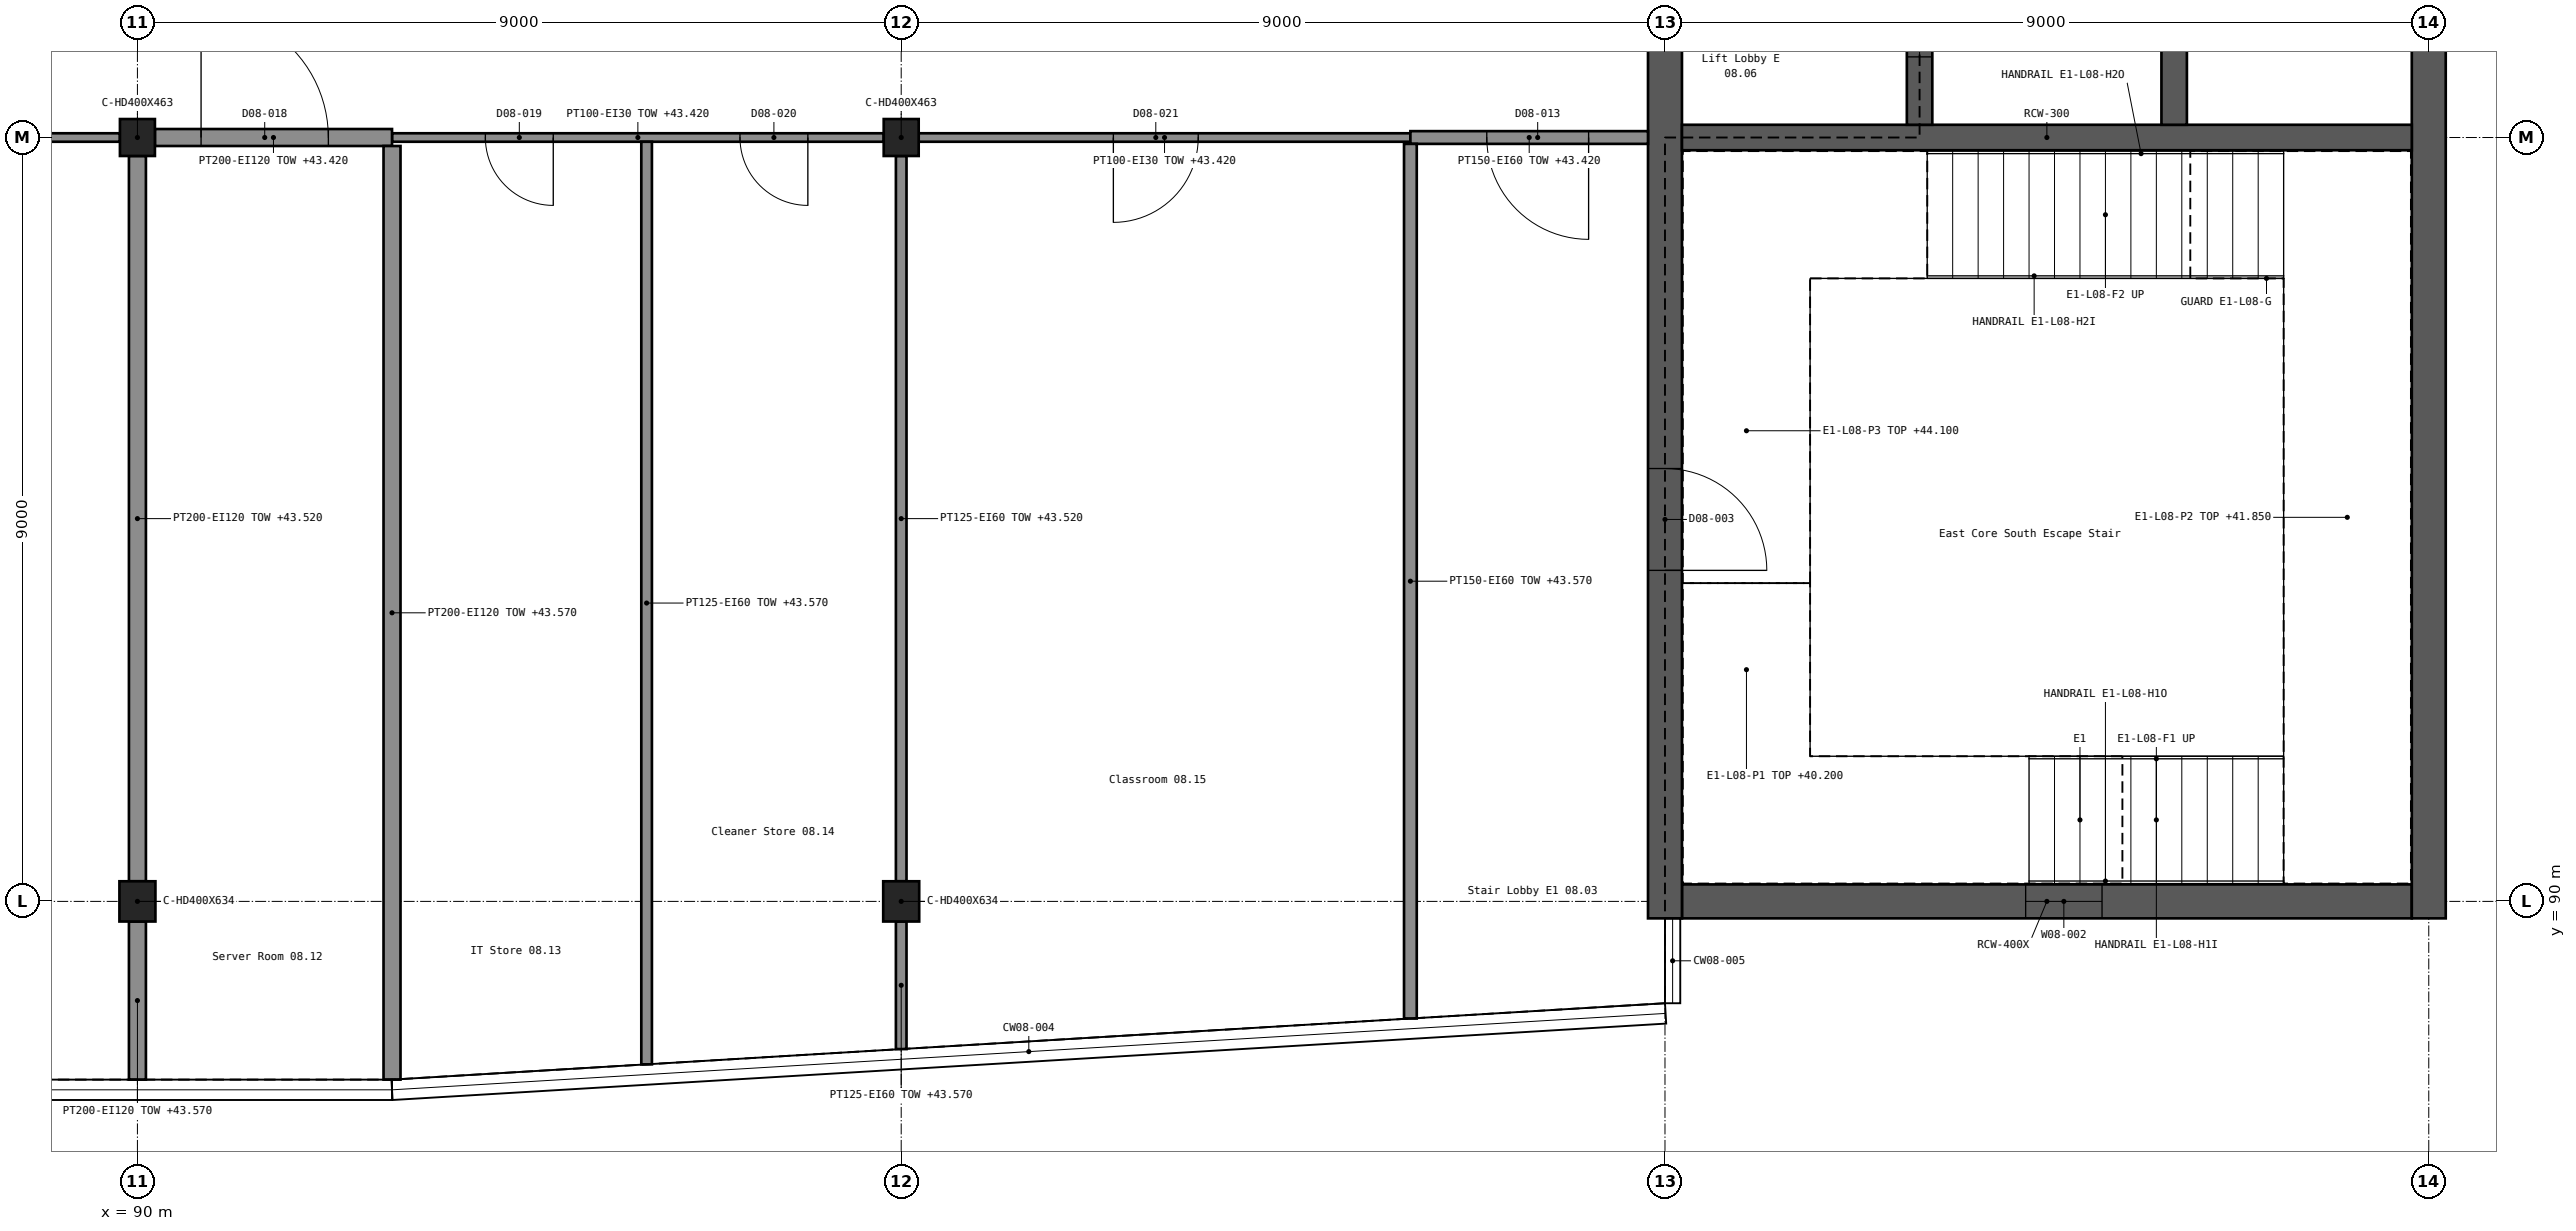
"""IFC4 building model, lengths in metres.
Left out: names, types, materials, properties, quantities, classifications, styles, units other than length and angle.
Written with IfcOpenShell. Run it as: python <this file> out.ifc"""

import sys

from ifc_helpers import new_model, si_unit, direction, frame, frame_2d, origin, origin_2d, place, context, subcontext, project, spatial, rectangle, i_section, extrude, element, fill, save


model = new_model("IFC4")
c1 = context("Model", 3, precision=1e-05, world=origin(), true_north=direction((0.0, 1.0)))
c2 = subcontext(c1, "Body", "Model", "MODEL_VIEW")
j1 = project(units=[si_unit("LENGTHUNIT", "METRE"), si_unit("PLANEANGLEUNIT", "RADIAN")], contexts=[c1])
p1 = place(None, origin())
s1 = spatial("IfcSite", under=j1, at=p1, CompositionType="ELEMENT")
p2 = place(p1, origin())
s2 = spatial("IfcBuilding", under=s1, at=p2, CompositionType="ELEMENT")
p3 = place(p2, frame((0.0, 0.0, 40.2)))
s3 = spatial("IfcBuildingStorey", under=s2, at=p3, CompositionType="ELEMENT", Elevation=40.2)
p4 = place(p3, frame((108.2, 90.0, 0.0), z_axis=(0.0, 0.0, 1.0), x_axis=(1.0, 0.0, 0.0)))
e1 = element("IfcWall", 1, at=p4, inside=s3, PredefinedType="SHEAR", context=c2, shape_type="SweptSolid", body=[
    extrude(rectangle(XDim=8.6, YDim=0.4, at=frame_2d((4.3, 0.0))), origin(), (0.0, 0.0, 1.0), 3.9),
])
p5 = place(p4, frame((4.05, 0.0, 1.2)))
e2 = element("IfcOpeningElement", 2, at=p5, cuts=e1, PredefinedType="OPENING", context=c2, shape_type="SweptSolid", body=[
    extrude(rectangle(XDim=0.9, YDim=1.5, at=frame_2d((0.45, 0.75))), frame((0.0, 0.211, 0.0), z_axis=(0.0, -1.0, 0.0), x_axis=(1.0, 0.0, 0.0)), (0.0, 0.0, 1.0), 0.422),
])
p6 = place(p3, frame((108.0, 89.8, 0.0), z_axis=(0.0, 0.0, 1.0), x_axis=(0.0, 1.0, 0.0)))
e3 = element("IfcWall", 3, at=p6, inside=s3, PredefinedType="SHEAR", context=c2, shape_type="SweptSolid", body=[
    extrude(rectangle(XDim=27.4, YDim=0.4, at=frame_2d((13.7, 0.0))), origin(), (0.0, 0.0, 1.0), 3.9),
])
p7 = place(p6, frame((4.1, 0.0, 0.0)))
e4 = element("IfcOpeningElement", 4, at=p7, cuts=e3, PredefinedType="OPENING", context=c2, shape_type="SweptSolid", body=[
    extrude(rectangle(XDim=1.2, YDim=2.1, at=frame_2d((0.6, 1.05))), frame((0.0, 0.211, 0.0), z_axis=(0.0, -1.0, 0.0), x_axis=(1.0, 0.0, 0.0)), (0.0, 0.0, 1.0), 0.422),
])
p8 = place(p6, frame((22.1, 0.0, 0.0)))
e5 = element("IfcOpeningElement", 5, at=p8, cuts=e3, PredefinedType="OPENING", context=c2, shape_type="SweptSolid", body=[
    extrude(rectangle(XDim=1.2, YDim=2.1, at=frame_2d((0.6, 1.05))), frame((0.0, 0.211, 0.0), z_axis=(0.0, -1.0, 0.0), x_axis=(1.0, 0.0, 0.0)), (0.0, 0.0, 1.0), 0.422),
])
p9 = place(p6, frame((12.5, 0.0, 0.0)))
e6 = element("IfcOpeningElement", 6, at=p9, cuts=e3, PredefinedType="OPENING", context=c2, shape_type="SweptSolid", body=[
    extrude(rectangle(XDim=2.0, YDim=2.1, at=frame_2d((1.0, 1.05))), frame((0.0, 0.211, 0.0), z_axis=(0.0, -1.0, 0.0), x_axis=(1.0, 0.0, 0.0)), (0.0, 0.0, 1.0), 0.422),
])
p10 = place(p3, frame((117.0, 89.8, 0.0), z_axis=(0.0, 0.0, 1.0), x_axis=(0.0, 1.0, 0.0)))
e7 = element("IfcWall", 7, at=p10, inside=s3, PredefinedType="SHEAR", context=c2, shape_type="SweptSolid", body=[
    extrude(rectangle(XDim=27.4, YDim=0.4, at=frame_2d((13.7, 0.0))), origin(), (0.0, 0.0, 1.0), 3.9),
])
p11 = place(p3, frame((108.2, 99.0, 0.0), z_axis=(0.0, 0.0, 1.0), x_axis=(1.0, 0.0, 0.0)))
e8 = element("IfcWall", 8, at=p11, inside=s3, PredefinedType="SHEAR", context=c2, shape_type="SweptSolid", body=[
    extrude(rectangle(XDim=8.6, YDim=0.3, at=frame_2d((4.3, 0.0))), origin(), (0.0, 0.0, 1.0), 3.9),
])
p12 = place(p3, frame((111.0, 99.15, 0.0), z_axis=(0.0, 0.0, 1.0), x_axis=(0.0, 1.0, 0.0)))
e9 = element("IfcWall", 9, at=p12, inside=s3, PredefinedType="SHEAR", context=c2, shape_type="SweptSolid", body=[
    extrude(rectangle(XDim=8.7, YDim=0.3, at=frame_2d((4.35, 0.0))), origin(), (0.0, 0.0, 1.0), 3.9),
])
p13 = place(p12, frame((0.8, 0.0, 0.0)))
e10 = element("IfcOpeningElement", 10, at=p13, cuts=e9, PredefinedType="OPENING", context=c2, shape_type="SweptSolid", body=[
    extrude(rectangle(XDim=1.1, YDim=2.1, at=frame_2d((0.55, 1.05))), frame((0.0, 0.161, 0.0), z_axis=(0.0, -1.0, 0.0), x_axis=(1.0, 0.0, 0.0)), (0.0, 0.0, 1.0), 0.322),
])
p14 = place(p12, frame((3.8, 0.0, 0.0)))
e11 = element("IfcOpeningElement", 11, at=p14, cuts=e9, PredefinedType="OPENING", context=c2, shape_type="SweptSolid", body=[
    extrude(rectangle(XDim=1.1, YDim=2.1, at=frame_2d((0.55, 1.05))), frame((0.0, 0.161, 0.0), z_axis=(0.0, -1.0, 0.0), x_axis=(1.0, 0.0, 0.0)), (0.0, 0.0, 1.0), 0.322),
])
p15 = place(p12, frame((6.8, 0.0, 0.0)))
e12 = element("IfcOpeningElement", 12, at=p15, cuts=e9, PredefinedType="OPENING", context=c2, shape_type="SweptSolid", body=[
    extrude(rectangle(XDim=1.1, YDim=2.1, at=frame_2d((0.55, 1.05))), frame((0.0, 0.161, 0.0), z_axis=(0.0, -1.0, 0.0), x_axis=(1.0, 0.0, 0.0)), (0.0, 0.0, 1.0), 0.322),
])
p16 = place(p3, frame((114.0, 99.15, 0.0), z_axis=(0.0, 0.0, 1.0), x_axis=(0.0, 1.0, 0.0)))
e13 = element("IfcWall", 13, at=p16, inside=s3, PredefinedType="SHEAR", context=c2, shape_type="SweptSolid", body=[
    extrude(rectangle(XDim=8.7, YDim=0.3, at=frame_2d((4.35, 0.0))), origin(), (0.0, 0.0, 1.0), 3.9),
])
for number, where, z_axis, x_axis in (
    (14, (90.0, 90.0, 0.0), (0.0, 0.0, 1.0), (1.0, 0.0, 0.0)),
    (15, (99.0, 90.0, 0.0), (0.0, 0.0, 1.0), (1.0, 0.0, 0.0)),
):
    element("IfcColumn", number, at=place(p3, frame(where, z_axis=z_axis, x_axis=x_axis)), inside=s3, PredefinedType="COLUMN", context=c2, shape_type="SweptSolid", body=[
        extrude(i_section(OverallWidth=0.424, OverallDepth=0.474, WebThickness=0.048, FlangeThickness=0.077, FilletRadius=0.015, at=origin_2d()), origin(), (0.0, 0.0, 1.0), 3.9),
    ])
for number, where, z_axis, x_axis in (
    (16, (90.0, 99.0, 0.0), (0.0, 0.0, 1.0), (1.0, 0.0, 0.0)),
    (17, (99.0, 99.0, 0.0), (0.0, 0.0, 1.0), (1.0, 0.0, 0.0)),
):
    element("IfcColumn", number, at=place(p3, frame(where, z_axis=z_axis, x_axis=x_axis)), inside=s3, PredefinedType="COLUMN", context=c2, shape_type="SweptSolid", body=[
        extrude(i_section(OverallWidth=0.412, OverallDepth=0.435, WebThickness=0.036, FlangeThickness=0.057, FilletRadius=0.015, at=origin_2d()), origin(), (0.0, 0.0, 1.0), 3.9),
    ])
p17 = place(p3, frame((81.206, 99.0, 0.0), z_axis=(0.0, 0.0, 1.0), x_axis=(1.0, 0.0, 0.0)))
e18 = element("IfcWall", 18, at=p17, inside=s3, PredefinedType="PARTITIONING", context=c2, shape_type="SweptSolid", body=[
    extrude(rectangle(XDim=8.588, YDim=0.1, at=frame_2d((4.294, 0.0))), origin(), (0.0, 0.0, 1.0), 3.22),
])
p18 = place(p17, frame((5.769, 0.0, 0.0)))
e19 = element("IfcOpeningElement", 19, at=p18, cuts=e18, PredefinedType="OPENING", context=c2, shape_type="SweptSolid", body=[
    extrude(rectangle(XDim=1.8, YDim=2.1, at=frame_2d((0.9, 1.05))), frame((0.0, 0.061, 0.0), z_axis=(0.0, -1.0, 0.0), x_axis=(1.0, 0.0, 0.0)), (0.0, 0.0, 1.0), 0.122),
])
p19 = place(p3, frame((93.0, 99.0, 0.0), z_axis=(0.0, 0.0, 1.0), x_axis=(1.0, 0.0, 0.0)))
e20 = element("IfcWall", 20, at=p19, inside=s3, PredefinedType="PARTITIONING", context=c2, shape_type="SweptSolid", body=[
    extrude(rectangle(XDim=5.794, YDim=0.1, at=frame_2d((2.897, 0.0))), origin(), (0.0, 0.0, 1.0), 3.22),
])
p20 = place(p19, frame((1.1, 0.0, 0.0)))
e21 = element("IfcOpeningElement", 21, at=p20, cuts=e20, PredefinedType="OPENING", context=c2, shape_type="SweptSolid", body=[
    extrude(rectangle(XDim=0.8, YDim=2.1, at=frame_2d((0.4, 1.05))), frame((0.0, 0.061, 0.0), z_axis=(0.0, -1.0, 0.0), x_axis=(1.0, 0.0, 0.0)), (0.0, 0.0, 1.0), 0.122),
])
p21 = place(p19, frame((4.1, 0.0, 0.0)))
e22 = element("IfcOpeningElement", 22, at=p21, cuts=e20, PredefinedType="OPENING", context=c2, shape_type="SweptSolid", body=[
    extrude(rectangle(XDim=0.8, YDim=2.1, at=frame_2d((0.4, 1.05))), frame((0.0, 0.061, 0.0), z_axis=(0.0, -1.0, 0.0), x_axis=(1.0, 0.0, 0.0)), (0.0, 0.0, 1.0), 0.122),
])
p22 = place(p3, frame((99.206, 99.0, 0.0), z_axis=(0.0, 0.0, 1.0), x_axis=(1.0, 0.0, 0.0)))
e23 = element("IfcWall", 23, at=p22, inside=s3, PredefinedType="PARTITIONING", context=c2, shape_type="SweptSolid", body=[
    extrude(rectangle(XDim=5.794, YDim=0.1, at=frame_2d((2.897, 0.0))), origin(), (0.0, 0.0, 1.0), 3.22),
])
p23 = place(p22, frame((2.294, 0.0, 0.0)))
e24 = element("IfcOpeningElement", 24, at=p23, cuts=e23, PredefinedType="OPENING", context=c2, shape_type="SweptSolid", body=[
    extrude(rectangle(XDim=1.0, YDim=2.1, at=frame_2d((0.5, 1.05))), frame((0.0, 0.061, 0.0), z_axis=(0.0, -1.0, 0.0), x_axis=(1.0, 0.0, 0.0)), (0.0, 0.0, 1.0), 0.122),
])
p24 = place(p3, frame((105.0, 99.0, 0.0), z_axis=(0.0, 0.0, 1.0), x_axis=(1.0, 0.0, 0.0)))
e25 = element("IfcWall", 25, at=p24, inside=s3, PredefinedType="PARTITIONING", context=c2, shape_type="SweptSolid", body=[
    extrude(rectangle(XDim=2.8, YDim=0.15, at=frame_2d((1.4, 0.0))), origin(), (0.0, 0.0, 1.0), 3.22),
])
p25 = place(p24, frame((0.9, 0.0, 0.0)))
e26 = element("IfcOpeningElement", 26, at=p25, cuts=e25, PredefinedType="OPENING", context=c2, shape_type="SweptSolid", body=[
    extrude(rectangle(XDim=1.2, YDim=2.1, at=frame_2d((0.6, 1.05))), frame((0.0, 0.086, 0.0), z_axis=(0.0, -1.0, 0.0), x_axis=(1.0, 0.0, 0.0)), (0.0, 0.0, 1.0), 0.172),
])
p26 = place(p3, frame((90.206, 99.0, 0.0), z_axis=(0.0, 0.0, 1.0), x_axis=(1.0, 0.0, 0.0)))
e27 = element("IfcWall", 27, at=p26, inside=s3, PredefinedType="PARTITIONING", context=c2, shape_type="SweptSolid", body=[
    extrude(rectangle(XDim=2.794, YDim=0.2, at=frame_2d((1.397, 0.0))), origin(), (0.0, 0.0, 1.0), 3.22),
])
p27 = place(p26, frame((0.544, 0.0, 0.0)))
e28 = element("IfcOpeningElement", 28, at=p27, cuts=e27, PredefinedType="OPENING", context=c2, shape_type="SweptSolid", body=[
    extrude(rectangle(XDim=1.5, YDim=2.4, at=frame_2d((0.75, 1.2))), frame((0.0, 0.111, 0.0), z_axis=(0.0, -1.0, 0.0), x_axis=(1.0, 0.0, 0.0)), (0.0, 0.0, 1.0), 0.222),
])
p28 = place(p3, frame((90.0, 87.9, 0.0), z_axis=(0.0, 0.0, 1.0), x_axis=(0.0, 1.0, 0.0)))
e29 = element("IfcWall", 29, at=p28, inside=s3, PredefinedType="PARTITIONING", context=c2, shape_type="SweptSolid", body=[
    extrude(rectangle(XDim=1.863, YDim=0.2, at=frame_2d((0.932, 0.0))), origin(), (0.0, 0.0, 1.0), 3.37),
])
p29 = place(p3, frame((90.0, 90.237, 0.0), z_axis=(0.0, 0.0, 1.0), x_axis=(0.0, 1.0, 0.0)))
e30 = element("IfcWall", 30, at=p29, inside=s3, PredefinedType="PARTITIONING", context=c2, shape_type="SweptSolid", body=[
    extrude(rectangle(XDim=8.545, YDim=0.2, at=frame_2d((4.273, 0.0))), origin(), (0.0, 0.0, 1.0), 3.32),
])
p30 = place(p3, frame((93.0, 87.9, 0.0), z_axis=(0.0, 0.0, 1.0), x_axis=(0.0, 1.0, 0.0)))
e31 = element("IfcWall", 31, at=p30, inside=s3, PredefinedType="PARTITIONING", context=c2, shape_type="SweptSolid", body=[
    extrude(rectangle(XDim=11.0, YDim=0.2, at=frame_2d((5.5, 0.0))), origin(), (0.0, 0.0, 1.0), 3.37),
])
p31 = place(p3, frame((96.0, 88.08, 0.0), z_axis=(0.0, 0.0, 1.0), x_axis=(0.0, 1.0, 0.0)))
e32 = element("IfcWall", 32, at=p31, inside=s3, PredefinedType="PARTITIONING", context=c2, shape_type="SweptSolid", body=[
    extrude(rectangle(XDim=10.87, YDim=0.125, at=frame_2d((5.435, 0.0))), origin(), (0.0, 0.0, 1.0), 3.37),
])
p32 = place(p3, frame((99.0, 88.26, 0.0), z_axis=(0.0, 0.0, 1.0), x_axis=(0.0, 1.0, 0.0)))
e33 = element("IfcWall", 33, at=p32, inside=s3, PredefinedType="PARTITIONING", context=c2, shape_type="SweptSolid", body=[
    extrude(rectangle(XDim=1.503, YDim=0.125, at=frame_2d((0.751, 0.0))), origin(), (0.0, 0.0, 1.0), 3.37),
])
p33 = place(p3, frame((99.0, 90.237, 0.0), z_axis=(0.0, 0.0, 1.0), x_axis=(0.0, 1.0, 0.0)))
e34 = element("IfcWall", 34, at=p33, inside=s3, PredefinedType="PARTITIONING", context=c2, shape_type="SweptSolid", body=[
    extrude(rectangle(XDim=8.545, YDim=0.125, at=frame_2d((4.273, 0.0))), origin(), (0.0, 0.0, 1.0), 3.32),
])
p34 = place(p3, frame((105.0, 88.62, 0.0), z_axis=(0.0, 0.0, 1.0), x_axis=(0.0, 1.0, 0.0)))
e35 = element("IfcWall", 35, at=p34, inside=s3, PredefinedType="PARTITIONING", context=c2, shape_type="SweptSolid", body=[
    extrude(rectangle(XDim=10.305, YDim=0.15, at=frame_2d((5.152, 0.0))), origin(), (0.0, 0.0, 1.0), 3.37),
])
p35 = place(p5, origin())
e36 = element("IfcWindow", 36, at=p35, inside=s3, PartitioningType="SINGLE_PANEL", PredefinedType="WINDOW", context=c2, shape_type="SweptSolid", body=[
    extrude(rectangle(XDim=0.9, YDim=1.5, at=frame_2d((0.45, 0.75))), frame((0.0, 0.03, 0.0), z_axis=(0.0, -1.0, 0.0), x_axis=(1.0, 0.0, 0.0)), (0.0, 0.0, 1.0), 0.06),
])
fill(e2, e36)
p36 = place(p7, frame((1.2, 0.0, 0.0), z_axis=(0.0, 0.0, 1.0), x_axis=(-1.0, 0.0, 0.0)))
e37 = element("IfcDoor", 37, at=p36, inside=s3, OperationType="SINGLE_SWING_RIGHT", PredefinedType="DOOR", context=c2, shape_type="SweptSolid", body=[
    extrude(rectangle(XDim=1.2, YDim=2.1, at=frame_2d((0.6, 1.05))), frame((0.0, 0.025, 0.0), z_axis=(0.0, -1.0, 0.0), x_axis=(1.0, 0.0, 0.0)), (0.0, 0.0, 1.0), 0.05),
])
fill(e4, e37)
p37 = place(p13, origin())
e38 = element("IfcDoor", 38, at=p37, inside=s3, OperationType="DOUBLE_DOOR_SLIDING", PredefinedType="DOOR", context=c2, shape_type="SweptSolid", body=[
    extrude(rectangle(XDim=1.1, YDim=2.1, at=frame_2d((0.55, 1.05))), frame((0.0, 0.025, 0.0), z_axis=(0.0, -1.0, 0.0), x_axis=(1.0, 0.0, 0.0)), (0.0, 0.0, 1.0), 0.05),
])
fill(e10, e38)
p38 = place(p25, frame((1.2, 0.0, 0.0), z_axis=(0.0, 0.0, 1.0), x_axis=(-1.0, 0.0, 0.0)))
e39 = element("IfcDoor", 39, at=p38, inside=s3, OperationType="SINGLE_SWING_LEFT", PredefinedType="DOOR", context=c2, shape_type="SweptSolid", body=[
    extrude(rectangle(XDim=1.2, YDim=2.1, at=frame_2d((0.6, 1.05))), frame((0.0, 0.025, 0.0), z_axis=(0.0, -1.0, 0.0), x_axis=(1.0, 0.0, 0.0)), (0.0, 0.0, 1.0), 0.05),
])
fill(e26, e39)
p39 = place(p27, origin())
e40 = element("IfcDoor", 40, at=p39, inside=s3, OperationType="DOUBLE_DOOR_SINGLE_SWING", PredefinedType="DOOR", context=c2, shape_type="SweptSolid", body=[
    extrude(rectangle(XDim=1.5, YDim=2.4, at=frame_2d((0.75, 1.2))), frame((0.0, 0.025, 0.0), z_axis=(0.0, -1.0, 0.0), x_axis=(1.0, 0.0, 0.0)), (0.0, 0.0, 1.0), 0.05),
])
fill(e28, e40)
p40 = place(p20, frame((0.8, 0.0, 0.0), z_axis=(0.0, 0.0, 1.0), x_axis=(-1.0, 0.0, 0.0)))
e41 = element("IfcDoor", 41, at=p40, inside=s3, OperationType="SINGLE_SWING_LEFT", PredefinedType="DOOR", context=c2, shape_type="SweptSolid", body=[
    extrude(rectangle(XDim=0.8, YDim=2.1, at=frame_2d((0.4, 1.05))), frame((0.0, 0.025, 0.0), z_axis=(0.0, -1.0, 0.0), x_axis=(1.0, 0.0, 0.0)), (0.0, 0.0, 1.0), 0.05),
])
fill(e21, e41)
p41 = place(p21, frame((0.8, 0.0, 0.0), z_axis=(0.0, 0.0, 1.0), x_axis=(-1.0, 0.0, 0.0)))
e42 = element("IfcDoor", 42, at=p41, inside=s3, OperationType="SINGLE_SWING_LEFT", PredefinedType="DOOR", context=c2, shape_type="SweptSolid", body=[
    extrude(rectangle(XDim=0.8, YDim=2.1, at=frame_2d((0.4, 1.05))), frame((0.0, 0.025, 0.0), z_axis=(0.0, -1.0, 0.0), x_axis=(1.0, 0.0, 0.0)), (0.0, 0.0, 1.0), 0.05),
])
fill(e22, e42)
p42 = place(p23, frame((1.0, 0.0, 0.0), z_axis=(0.0, 0.0, 1.0), x_axis=(-1.0, 0.0, 0.0)))
e43 = element("IfcDoor", 43, at=p42, inside=s3, OperationType="SINGLE_SWING_RIGHT", PredefinedType="DOOR", context=c2, shape_type="SweptSolid", body=[
    extrude(rectangle(XDim=1.0, YDim=2.1, at=frame_2d((0.5, 1.05))), frame((0.0, 0.025, 0.0), z_axis=(0.0, -1.0, 0.0), x_axis=(1.0, 0.0, 0.0)), (0.0, 0.0, 1.0), 0.05),
])
fill(e24, e43)
save(model, sys.argv[1])
